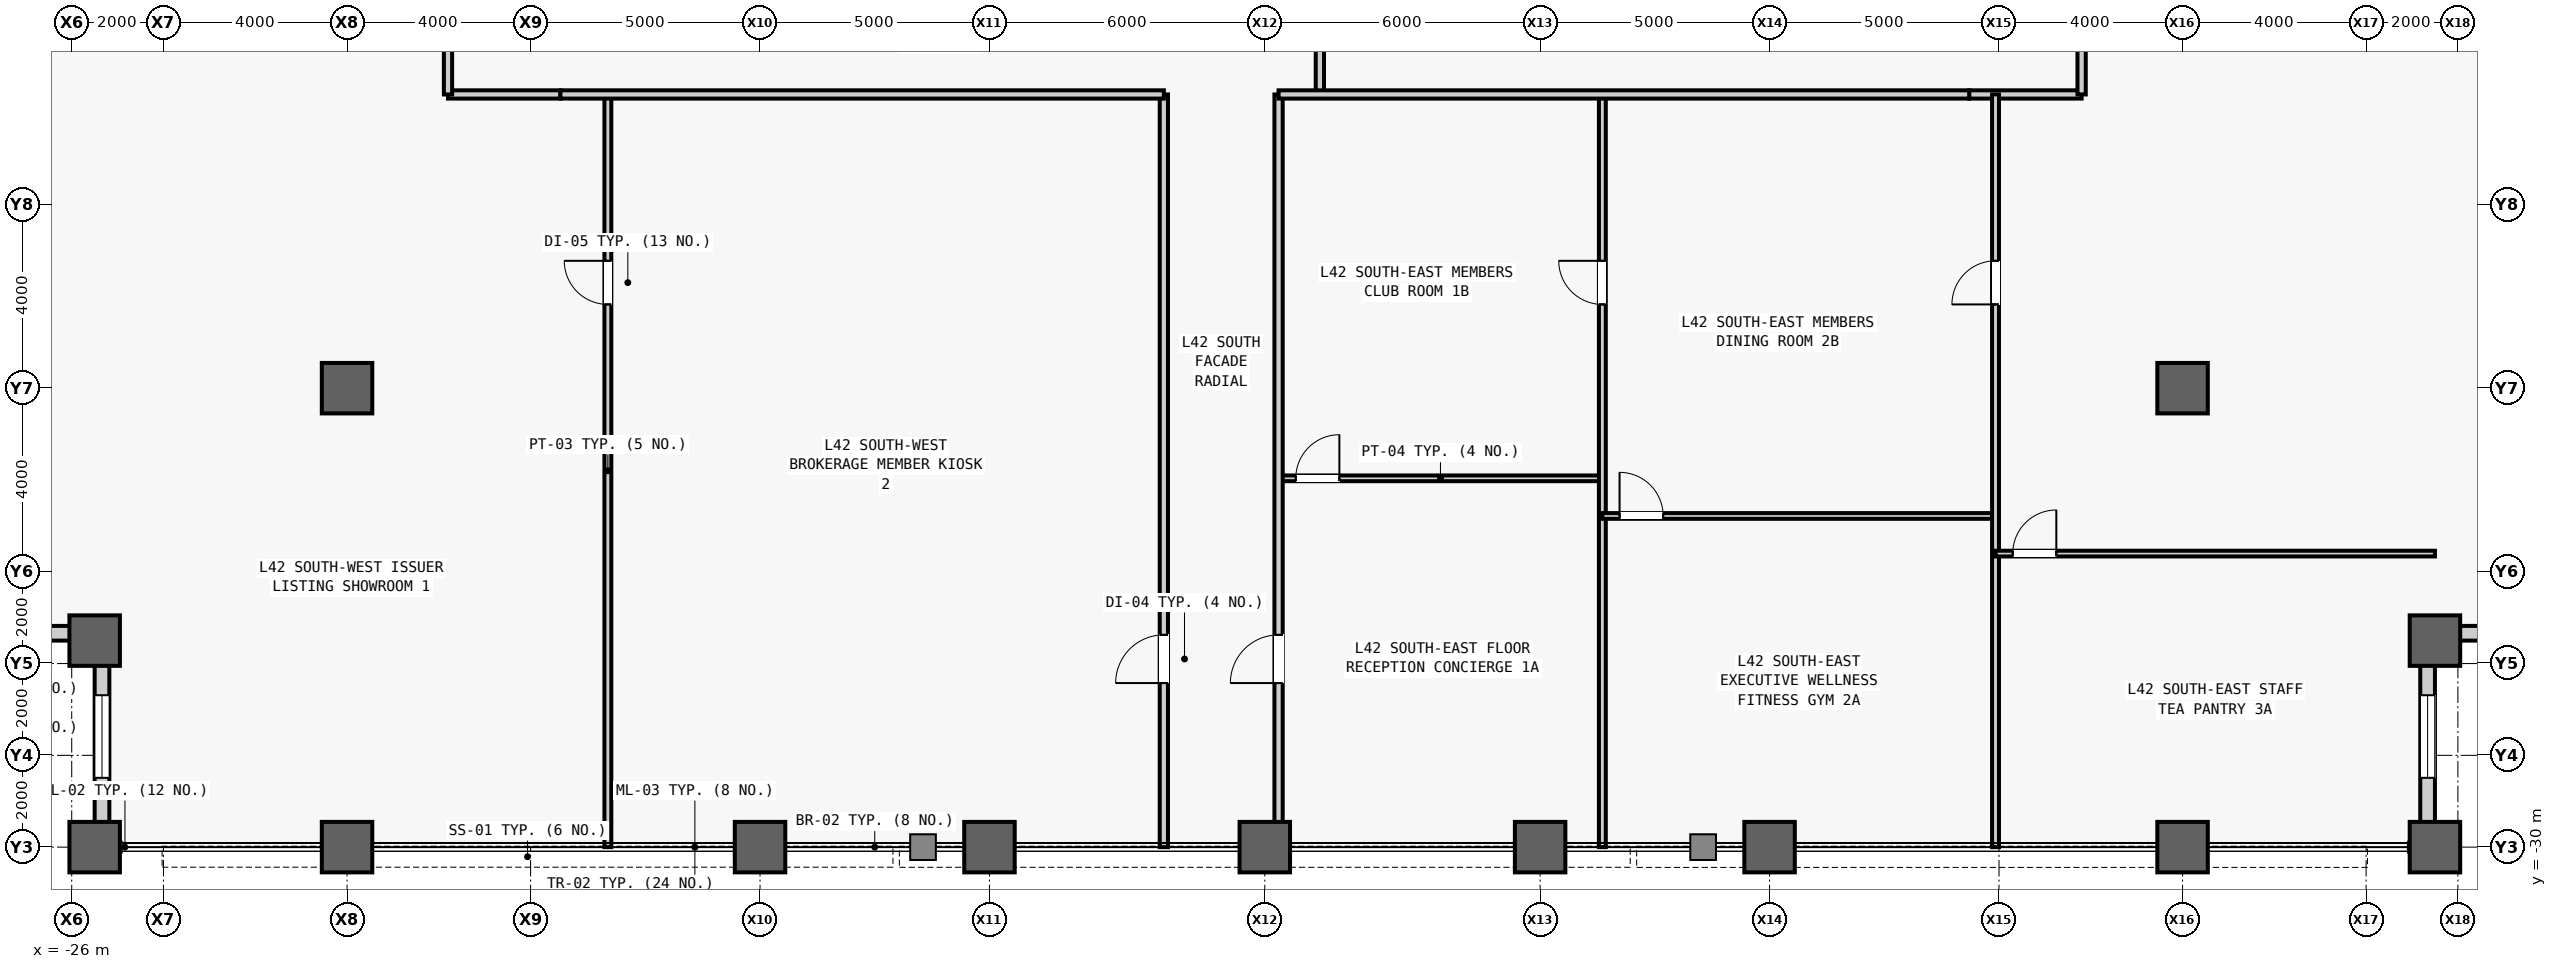
"""IFC4 building model, lengths in metres.
Left out: names, types, materials, properties, quantities, classifications, styles, units other than length and angle.
Written with IfcOpenShell. Run it as: python <this file> out.ifc"""

import sys

from ifc_helpers import new_model, si_unit, direction, frame, frame_2d, origin, origin_2d, place, context, subcontext, project, spatial, rectangle, hollow_rectangle, extrude, source, transform, mapped, element, fill, save


model = new_model("IFC4")
c1 = context("Model", 3, precision=1e-05, world=origin(), true_north=direction((0.0, 1.0)))
c2 = subcontext(c1, "Body", "Model", "MODEL_VIEW")
j1 = project(units=[si_unit("LENGTHUNIT", "METRE"), si_unit("PLANEANGLEUNIT", "RADIAN")], contexts=[c1])
p1 = place(None, origin())
s1 = spatial("IfcSite", under=j1, at=p1, CompositionType="ELEMENT")
p2 = place(p1, origin())
s2 = spatial("IfcBuilding", under=s1, at=p2, CompositionType="ELEMENT")
p3 = place(p2, frame((0.0, 0.0, 183.1)))
s3 = spatial("IfcBuildingStorey", under=s2, at=p3, CompositionType="ELEMENT", Elevation=183.1)
m1 = source(origin(), c2, "Body", "SweptSolid", [
    extrude(hollow_rectangle(XDim=1.1, YDim=1.1, WallThickness=0.06, at=origin_2d()), origin(), (0.0, 0.0, 1.0), 4.0),
])
for number, where, z_axis, x_axis in (
    (1, (-25.5, -30.0, 0.0), (0.0, 0.0, 1.0), (1.0, 0.0, 0.0)),
    (2, (-25.5, -25.5, 0.0), (0.0, 0.0, 1.0), (1.0, 0.0, 0.0)),
    (3, (-20.0, -30.0, 0.0), (0.0, 0.0, 1.0), (1.0, 0.0, 0.0)),
    (4, (-20.0, -20.0, 0.0), (0.0, 0.0, 1.0), (1.0, 0.0, 0.0)),
    (5, (-11.0, -30.0, 0.0), (0.0, 0.0, 1.0), (1.0, 0.0, 0.0)),
    (6, (-6.0, -30.0, 0.0), (0.0, 0.0, 1.0), (1.0, 0.0, 0.0)),
    (7, (0.0, -30.0, 0.0), (0.0, 0.0, 1.0), (1.0, 0.0, 0.0)),
    (8, (6.0, -30.0, 0.0), (0.0, 0.0, 1.0), (1.0, 0.0, 0.0)),
    (9, (11.0, -30.0, 0.0), (0.0, 0.0, 1.0), (1.0, 0.0, 0.0)),
    (10, (20.0, -30.0, 0.0), (0.0, 0.0, 1.0), (1.0, 0.0, 0.0)),
    (11, (20.0, -20.0, 0.0), (0.0, 0.0, 1.0), (1.0, 0.0, 0.0)),
    (12, (25.5, -30.0, 0.0), (0.0, 0.0, 1.0), (1.0, 0.0, 0.0)),
    (13, (25.5, -25.5, 0.0), (0.0, 0.0, 1.0), (1.0, 0.0, 0.0)),
):
    element("IfcColumn", number, at=place(p3, frame(where, z_axis=z_axis, x_axis=x_axis)), inside=s3, PredefinedType="COLUMN", context=c2, shape_type="MappedRepresentation", body=[
        mapped(m1, transform((0.0, 0.0, 0.0), scale=1.0)),
    ])
m2 = source(origin(), c2, "Body", "SweptSolid", [
    extrude(rectangle(XDim=4.18, YDim=0.32, at=frame_2d((2.09, 0.0))), origin(), (0.0, 0.0, 1.0), 3.164),
])
p4 = place(p3, frame((-25.5, -25.34, 0.0), z_axis=(0.0, 0.0, 1.0), x_axis=(-1.0, 0.0, 0.0)))
e14 = element("IfcWall", 14, at=p4, inside=s3, PredefinedType="STANDARD", context=c2, shape_type="MappedRepresentation", body=[
    mapped(m2, transform((0.0, 0.0, 0.0), scale=1.0)),
])
m3 = source(origin(), c2, "Body", "SweptSolid", [
    extrude(rectangle(XDim=1.8, YDim=2.4, at=frame_2d((0.9, 1.2))), frame((0.0, 0.17, 0.0), z_axis=(0.0, -1.0, 0.0), x_axis=(1.0, 0.0, 0.0)), (0.0, 0.0, 1.0), 0.34),
])
p5 = place(p4, frame((1.19, 0.0, 0.5)))
e15 = element("IfcOpeningElement", 15, at=p5, cuts=e14, PredefinedType="OPENING", context=c2, shape_type="MappedRepresentation", body=[
    mapped(m3, transform((0.0, 0.0, 0.0), scale=1.0)),
])
p6 = place(p3, frame((-25.34, -29.68, 0.0), z_axis=(0.0, 0.0, 1.0), x_axis=(0.0, 1.0, 0.0)))
e16 = element("IfcWall", 16, at=p6, inside=s3, PredefinedType="STANDARD", context=c2, shape_type="MappedRepresentation", body=[
    mapped(m2, transform((0.0, 0.0, 0.0), scale=1.0)),
])
p7 = place(p6, frame((1.19, 0.0, 0.5)))
e17 = element("IfcOpeningElement", 17, at=p7, cuts=e16, PredefinedType="OPENING", context=c2, shape_type="MappedRepresentation", body=[
    mapped(m3, transform((0.0, 0.0, 0.0), scale=1.0)),
])
p8 = place(p3, frame((25.34, -29.68, 0.0), z_axis=(0.0, 0.0, 1.0), x_axis=(0.0, 1.0, 0.0)))
e18 = element("IfcWall", 18, at=p8, inside=s3, PredefinedType="STANDARD", context=c2, shape_type="MappedRepresentation", body=[
    mapped(m2, transform((0.0, 0.0, 0.0), scale=1.0)),
])
p9 = place(p8, frame((1.19, 0.0, 0.5)))
e19 = element("IfcOpeningElement", 19, at=p9, cuts=e18, PredefinedType="OPENING", context=c2, shape_type="MappedRepresentation", body=[
    mapped(m3, transform((0.0, 0.0, 0.0), scale=1.0)),
])
p10 = place(p3, frame((25.5, -25.34, 0.0), z_axis=(0.0, 0.0, 1.0), x_axis=(1.0, 0.0, 0.0)))
e20 = element("IfcWall", 20, at=p10, inside=s3, PredefinedType="STANDARD", context=c2, shape_type="MappedRepresentation", body=[
    mapped(m2, transform((0.0, 0.0, 0.0), scale=1.0)),
])
p11 = place(p10, frame((1.19, 0.0, 0.5)))
e21 = element("IfcOpeningElement", 21, at=p11, cuts=e20, PredefinedType="OPENING", context=c2, shape_type="MappedRepresentation", body=[
    mapped(m3, transform((0.0, 0.0, 0.0), scale=1.0)),
])
m4 = source(origin(), c2, "Body", "SweptSolid", [
    extrude(rectangle(XDim=2.45, YDim=0.18, at=frame_2d((1.225, 0.0))), origin(), (0.0, 0.0, 1.0), 3.78),
])
for number, where, z_axis, x_axis in (
    (22, (15.35, -13.6, 0.0), (0.0, 0.0, 1.0), (1.0, 0.0, 0.0)),
    (23, (-17.8, -13.6, 0.0), (0.0, 0.0, 1.0), (1.0, 0.0, 0.0)),
):
    element("IfcWall", number, at=place(p3, frame(where, z_axis=z_axis, x_axis=x_axis)), inside=s3, PredefinedType="PARTITIONING", context=c2, shape_type="MappedRepresentation", body=[
        mapped(m4, transform((0.0, 0.0, 0.0), scale=1.0)),
    ])
m5 = source(origin(), c2, "Body", "SweptSolid", [
    extrude(rectangle(XDim=2.6, YDim=0.18, at=frame_2d((1.3, 0.0))), origin(), (0.0, 0.0, 1.0), 3.78),
])
p12 = place(p3, frame((1.2, -13.6, 0.0), z_axis=(0.0, 0.0, 1.0), x_axis=(0.0, 1.0, 0.0)))
e24 = element("IfcWall", 24, at=p12, inside=s3, PredefinedType="PARTITIONING", context=c2, shape_type="MappedRepresentation", body=[
    mapped(m5, transform((0.0, 0.0, 0.0), scale=1.0)),
])
m6 = source(origin(), c2, "Body", "SweptSolid", [
    extrude(rectangle(XDim=16.4, YDim=0.15, at=frame_2d((8.2, 0.0))), origin(), (0.0, 0.0, 1.0), 3.78),
])
p13 = place(p3, frame((-14.316, -30.0, 0.0), z_axis=(0.0, 0.0, 1.0), x_axis=(0.0, 1.0, 0.0)))
e25 = element("IfcWall", 25, at=p13, inside=s3, PredefinedType="PARTITIONING", context=c2, shape_type="MappedRepresentation", body=[
    mapped(m6, transform((0.0, 0.0, 0.0), scale=1.0)),
])
m7 = source(origin(), c2, "Body", "SweptSolid", [
    extrude(rectangle(XDim=0.95, YDim=2.15, at=frame_2d((0.475, 1.075))), frame((0.0, 0.085, 0.0), z_axis=(0.0, -1.0, 0.0), x_axis=(1.0, 0.0, 0.0)), (0.0, 0.0, 1.0), 0.17),
])
p14 = place(p13, frame((11.825, 0.0, 0.0)))
e26 = element("IfcOpeningElement", 26, at=p14, cuts=e25, PredefinedType="OPENING", context=c2, shape_type="MappedRepresentation", body=[
    mapped(m7, transform((0.0, 0.0, 0.0), scale=1.0)),
])
m8 = source(origin(), c2, "Body", "SweptSolid", [
    extrude(rectangle(XDim=16.4, YDim=0.18, at=frame_2d((8.2, 0.0))), origin(), (0.0, 0.0, 1.0), 3.78),
])
p15 = place(p3, frame((-2.2, -30.0, 0.0), z_axis=(0.0, 0.0, 1.0), x_axis=(0.0, 1.0, 0.0)))
e27 = element("IfcWall", 27, at=p15, inside=s3, PredefinedType="PARTITIONING", context=c2, shape_type="MappedRepresentation", body=[
    mapped(m8, transform((0.0, 0.0, 0.0), scale=1.0)),
])
m9 = source(origin(), c2, "Body", "SweptSolid", [
    extrude(rectangle(XDim=1.05, YDim=2.2, at=frame_2d((0.525, 1.1))), frame((0.0, 0.1, 0.0), z_axis=(0.0, -1.0, 0.0), x_axis=(1.0, 0.0, 0.0)), (0.0, 0.0, 1.0), 0.2),
])
p16 = place(p15, frame((3.575, 0.0, 0.0)))
e28 = element("IfcOpeningElement", 28, at=p16, cuts=e27, PredefinedType="OPENING", context=c2, shape_type="MappedRepresentation", body=[
    mapped(m9, transform((0.0, 0.0, 0.0), scale=1.0)),
])
m10 = source(origin(), c2, "Body", "SweptSolid", [
    extrude(rectangle(XDim=13.15, YDim=0.18, at=frame_2d((6.575, 0.0))), origin(), (0.0, 0.0, 1.0), 3.78),
])
p17 = place(p3, frame((-15.35, -13.6, 0.0), z_axis=(0.0, 0.0, 1.0), x_axis=(1.0, 0.0, 0.0)))
e29 = element("IfcWall", 29, at=p17, inside=s3, PredefinedType="PARTITIONING", context=c2, shape_type="MappedRepresentation", body=[
    mapped(m10, transform((0.0, 0.0, 0.0), scale=1.0)),
])
m11 = source(origin(), c2, "Body", "SweptSolid", [
    extrude(rectangle(XDim=7.056, YDim=0.125, at=frame_2d((3.528, 0.0))), origin(), (0.0, 0.0, 1.0), 3.78),
])
p18 = place(p3, frame((0.3, -21.964, 0.0), z_axis=(0.0, 0.0, 1.0), x_axis=(1.0, 0.0, 0.0)))
e30 = element("IfcWall", 30, at=p18, inside=s3, PredefinedType="PARTITIONING", context=c2, shape_type="MappedRepresentation", body=[
    mapped(m11, transform((0.0, 0.0, 0.0), scale=1.0)),
])
m12 = source(origin(), c2, "Body", "SweptSolid", [
    extrude(rectangle(XDim=0.95, YDim=2.15, at=frame_2d((0.475, 1.075))), frame((0.0, 0.073, 0.0), z_axis=(0.0, -1.0, 0.0), x_axis=(1.0, 0.0, 0.0)), (0.0, 0.0, 1.0), 0.145),
])
p19 = place(p18, frame((0.375, 0.0, 0.0)))
e31 = element("IfcOpeningElement", 31, at=p19, cuts=e30, PredefinedType="OPENING", context=c2, shape_type="MappedRepresentation", body=[
    mapped(m12, transform((0.0, 0.0, 0.0), scale=1.0)),
])
p20 = place(p3, frame((7.356, -30.0, 0.0), z_axis=(0.0, 0.0, 1.0), x_axis=(0.0, 1.0, 0.0)))
e32 = element("IfcWall", 32, at=p20, inside=s3, PredefinedType="PARTITIONING", context=c2, shape_type="MappedRepresentation", body=[
    mapped(m6, transform((0.0, 0.0, 0.0), scale=1.0)),
])
p21 = place(p20, frame((11.825, 0.0, 0.0)))
e33 = element("IfcOpeningElement", 33, at=p21, cuts=e32, PredefinedType="OPENING", context=c2, shape_type="MappedRepresentation", body=[
    mapped(m7, transform((0.0, 0.0, 0.0), scale=1.0)),
])
m13 = source(origin(), c2, "Body", "SweptSolid", [
    extrude(rectangle(XDim=8.568, YDim=0.125, at=frame_2d((4.284, 0.0))), origin(), (0.0, 0.0, 1.0), 3.78),
])
p22 = place(p3, frame((7.356, -22.784, 0.0), z_axis=(0.0, 0.0, 1.0), x_axis=(1.0, 0.0, 0.0)))
e34 = element("IfcWall", 34, at=p22, inside=s3, PredefinedType="PARTITIONING", context=c2, shape_type="MappedRepresentation", body=[
    mapped(m13, transform((0.0, 0.0, 0.0), scale=1.0)),
])
p23 = place(p22, frame((0.375, 0.0, 0.0)))
e35 = element("IfcOpeningElement", 35, at=p23, cuts=e34, PredefinedType="OPENING", context=c2, shape_type="MappedRepresentation", body=[
    mapped(m12, transform((0.0, 0.0, 0.0), scale=1.0)),
])
p24 = place(p3, frame((15.924, -30.0, 0.0), z_axis=(0.0, 0.0, 1.0), x_axis=(0.0, 1.0, 0.0)))
e36 = element("IfcWall", 36, at=p24, inside=s3, PredefinedType="PARTITIONING", context=c2, shape_type="MappedRepresentation", body=[
    mapped(m6, transform((0.0, 0.0, 0.0), scale=1.0)),
])
p25 = place(p24, frame((11.825, 0.0, 0.0)))
e37 = element("IfcOpeningElement", 37, at=p25, cuts=e36, PredefinedType="OPENING", context=c2, shape_type="MappedRepresentation", body=[
    mapped(m7, transform((0.0, 0.0, 0.0), scale=1.0)),
])
m14 = source(origin(), c2, "Body", "SweptSolid", [
    extrude(rectangle(XDim=9.576, YDim=0.125, at=frame_2d((4.788, 0.0))), origin(), (0.0, 0.0, 1.0), 3.78),
])
p26 = place(p3, frame((15.924, -23.604, 0.0), z_axis=(0.0, 0.0, 1.0), x_axis=(1.0, 0.0, 0.0)))
e38 = element("IfcWall", 38, at=p26, inside=s3, PredefinedType="PARTITIONING", context=c2, shape_type="MappedRepresentation", body=[
    mapped(m14, transform((0.0, 0.0, 0.0), scale=1.0)),
])
p27 = place(p26, frame((0.375, 0.0, 0.0)))
e39 = element("IfcOpeningElement", 39, at=p27, cuts=e38, PredefinedType="OPENING", context=c2, shape_type="MappedRepresentation", body=[
    mapped(m12, transform((0.0, 0.0, 0.0), scale=1.0)),
])
m15 = source(origin(), c2, "Body", "SweptSolid", [
    extrude(rectangle(XDim=16.4, YDim=0.18, at=frame_2d((8.2, 0.0))), origin(), (0.0, 0.0, 1.0), 3.007),
])
p28 = place(p3, frame((0.3, -30.0, 0.0), z_axis=(0.0, 0.0, 1.0), x_axis=(0.0, 1.0, 0.0)))
e40 = element("IfcWall", 40, at=p28, inside=s3, PredefinedType="PARTITIONING", context=c2, shape_type="MappedRepresentation", body=[
    mapped(m15, transform((0.0, 0.0, 0.0), scale=1.0)),
])
p29 = place(p28, frame((3.575, 0.0, 0.0)))
e41 = element("IfcOpeningElement", 41, at=p29, cuts=e40, PredefinedType="OPENING", context=c2, shape_type="MappedRepresentation", body=[
    mapped(m9, transform((0.0, 0.0, 0.0), scale=1.0)),
])
m16 = source(origin(), c2, "Body", "SweptSolid", [
    extrude(rectangle(XDim=15.05, YDim=0.18, at=frame_2d((7.525, 0.0))), origin(), (0.0, 0.0, 1.0), 3.78),
])
p30 = place(p3, frame((0.3, -13.6, 0.0), z_axis=(0.0, 0.0, 1.0), x_axis=(1.0, 0.0, 0.0)))
e42 = element("IfcWall", 42, at=p30, inside=s3, PredefinedType="PARTITIONING", context=c2, shape_type="MappedRepresentation", body=[
    mapped(m16, transform((0.0, 0.0, 0.0), scale=1.0)),
])
m17 = source(origin(), c2, "Body", "SweptSolid", [
    extrude(rectangle(XDim=9.5, YDim=0.18, at=frame_2d((4.75, 0.0))), origin(), (0.0, 0.0, 1.0), 3.78),
])
p31 = place(p3, frame((-17.8, -13.6, 0.0), z_axis=(0.0, 0.0, 1.0), x_axis=(0.0, 1.0, 0.0)))
e43 = element("IfcWall", 43, at=p31, inside=s3, PredefinedType="PARTITIONING", context=c2, shape_type="MappedRepresentation", body=[
    mapped(m17, transform((0.0, 0.0, 0.0), scale=1.0)),
])
m18 = source(origin(), c2, "Body", "SweptSolid", [
    extrude(rectangle(XDim=17.3, YDim=0.18, at=frame_2d((8.65, 0.0))), origin(), (0.0, 0.0, 1.0), 3.78),
])
p32 = place(p3, frame((17.8, -13.6, 0.0), z_axis=(0.0, 0.0, 1.0), x_axis=(0.0, 1.0, 0.0)))
e44 = element("IfcWall", 44, at=p32, inside=s3, PredefinedType="PARTITIONING", context=c2, shape_type="MappedRepresentation", body=[
    mapped(m18, transform((0.0, 0.0, 0.0), scale=1.0)),
])
m19 = source(origin(), c2, "Body", "SweptSolid", [
    extrude(rectangle(XDim=1.8, YDim=2.4, at=frame_2d((0.9, 1.2))), frame((0.0, 0.03, 0.0), z_axis=(0.0, -1.0, 0.0), x_axis=(1.0, 0.0, 0.0)), (0.0, 0.0, 1.0), 0.06),
])
p33 = place(p7, origin())
e45 = element("IfcWindow", 45, at=p33, inside=s3, PartitioningType="SINGLE_PANEL", PredefinedType="WINDOW", context=c2, shape_type="MappedRepresentation", body=[
    mapped(m19, transform((0.0, 0.0, 0.0), scale=1.0)),
])
fill(e17, e45)
p34 = place(p9, origin())
e46 = element("IfcWindow", 46, at=p34, inside=s3, PartitioningType="SINGLE_PANEL", PredefinedType="WINDOW", context=c2, shape_type="MappedRepresentation", body=[
    mapped(m19, transform((0.0, 0.0, 0.0), scale=1.0)),
])
fill(e19, e46)
m20 = source(origin(), c2, "Body", "SweptSolid", [
    extrude(rectangle(XDim=0.95, YDim=2.15, at=frame_2d((0.475, 1.075))), frame((0.0, 0.025, 0.0), z_axis=(0.0, -1.0, 0.0), x_axis=(1.0, 0.0, 0.0)), (0.0, 0.0, 1.0), 0.05),
])
p35 = place(p14, origin())
e47 = element("IfcDoor", 47, at=p35, inside=s3, OperationType="SINGLE_SWING_RIGHT", PredefinedType="DOOR", context=c2, shape_type="MappedRepresentation", body=[
    mapped(m20, transform((0.0, 0.0, 0.0), scale=1.0)),
])
fill(e26, e47)
m21 = source(origin(), c2, "Body", "SweptSolid", [
    extrude(rectangle(XDim=1.05, YDim=2.2, at=frame_2d((0.525, 1.1))), frame((0.0, 0.025, 0.0), z_axis=(0.0, -1.0, 0.0), x_axis=(1.0, 0.0, 0.0)), (0.0, 0.0, 1.0), 0.05),
])
p36 = place(p16, origin())
e48 = element("IfcDoor", 48, at=p36, inside=s3, OperationType="SINGLE_SWING_LEFT", PredefinedType="DOOR", context=c2, shape_type="MappedRepresentation", body=[
    mapped(m21, transform((0.0, 0.0, 0.0), scale=1.0)),
])
fill(e28, e48)
p37 = place(p19, origin())
e49 = element("IfcDoor", 49, at=p37, inside=s3, OperationType="SINGLE_SWING_RIGHT", PredefinedType="DOOR", context=c2, shape_type="MappedRepresentation", body=[
    mapped(m20, transform((0.0, 0.0, 0.0), scale=1.0)),
])
fill(e31, e49)
p38 = place(p21, origin())
e50 = element("IfcDoor", 50, at=p38, inside=s3, OperationType="SINGLE_SWING_RIGHT", PredefinedType="DOOR", context=c2, shape_type="MappedRepresentation", body=[
    mapped(m20, transform((0.0, 0.0, 0.0), scale=1.0)),
])
fill(e33, e50)
p39 = place(p23, origin())
e51 = element("IfcDoor", 51, at=p39, inside=s3, OperationType="SINGLE_SWING_LEFT", PredefinedType="DOOR", context=c2, shape_type="MappedRepresentation", body=[
    mapped(m20, transform((0.0, 0.0, 0.0), scale=1.0)),
])
fill(e35, e51)
p40 = place(p25, origin())
e52 = element("IfcDoor", 52, at=p40, inside=s3, OperationType="SINGLE_SWING_LEFT", PredefinedType="DOOR", context=c2, shape_type="MappedRepresentation", body=[
    mapped(m20, transform((0.0, 0.0, 0.0), scale=1.0)),
])
fill(e37, e52)
p41 = place(p27, origin())
e53 = element("IfcDoor", 53, at=p41, inside=s3, OperationType="SINGLE_SWING_RIGHT", PredefinedType="DOOR", context=c2, shape_type="MappedRepresentation", body=[
    mapped(m20, transform((0.0, 0.0, 0.0), scale=1.0)),
])
fill(e39, e53)
p42 = place(p29, origin())
e54 = element("IfcDoor", 54, at=p42, inside=s3, OperationType="SINGLE_SWING_LEFT", PredefinedType="DOOR", context=c2, shape_type="MappedRepresentation", body=[
    mapped(m21, transform((0.0, 0.0, 0.0), scale=1.0)),
])
fill(e41, e54)
save(model, sys.argv[1])
